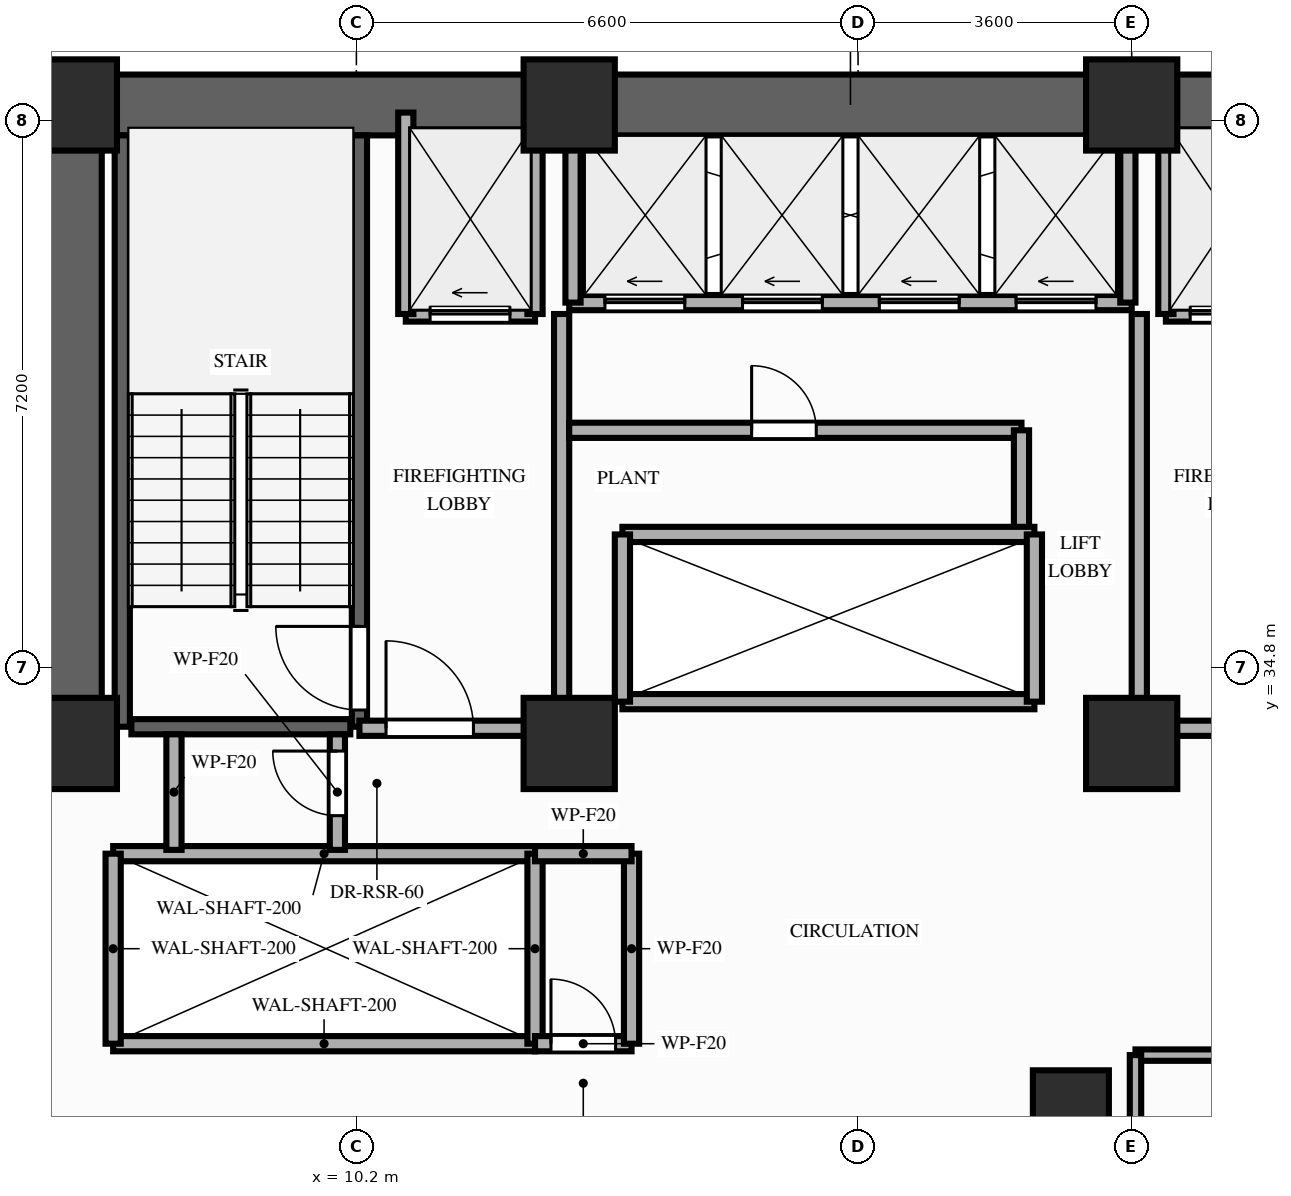
"""IFC4 building model, lengths in metres.
Left out: names, types, materials, properties, quantities, classifications, styles, units other than length and angle.
Written with IfcOpenShell. Run it as: python <this file> out.ifc"""

import sys

from ifc_helpers import new_model, si_unit, direction, frame, frame_2d, origin, origin_2d, place, context, subcontext, project, spatial, rectangle, extrude, element, fill, save


model = new_model("IFC4")
c1 = context("Model", 3, precision=1e-05, world=origin(), true_north=direction((0.0, 1.0)))
c2 = subcontext(c1, "Body", "Model", "MODEL_VIEW")
j1 = project(units=[si_unit("LENGTHUNIT", "METRE"), si_unit("PLANEANGLEUNIT", "RADIAN")], contexts=[c1])
p1 = place(None, origin())
s1 = spatial("IfcSite", under=j1, at=p1, CompositionType="ELEMENT")
p2 = place(p1, origin())
s2 = spatial("IfcBuilding", under=s1, at=p2, CompositionType="ELEMENT")
p3 = place(p2, frame((0.0, 0.0, 39.8)))
s3 = spatial("IfcBuildingStorey", under=s2, at=p3, CompositionType="ELEMENT", Elevation=39.8)
for number, where, z_axis, x_axis in (
    (1, (6.45, 33.8, 0.0), (0.0, 0.0, 1.0), (1.0, 0.0, 0.0)),
    (2, (13.0, 33.8, 0.0), (0.0, 0.0, 1.0), (1.0, 0.0, 0.0)),
    (3, (20.4, 33.8, 0.0), (0.0, 0.0, 1.0), (1.0, 0.0, 0.0)),
    (4, (6.45, 42.2, 0.0), (0.0, 0.0, 1.0), (1.0, 0.0, 0.0)),
    (5, (13.0, 42.2, 0.0), (0.0, 0.0, 1.0), (1.0, 0.0, 0.0)),
    (6, (20.4, 42.2, 0.0), (0.0, 0.0, 1.0), (1.0, 0.0, 0.0)),
):
    element("IfcColumn", number, at=place(p3, frame(where, z_axis=z_axis, x_axis=x_axis)), inside=s3, PredefinedType="COLUMN", context=c2, shape_type="SweptSolid", body=[
        extrude(rectangle(XDim=1.2, YDim=1.2, at=origin_2d()), origin(), (0.0, 0.0, 1.0), 3.8),
    ])
p4 = place(p3, frame((19.6, 28.8, 0.0), z_axis=(0.0, 0.0, 1.0), x_axis=(1.0, 0.0, 0.0)))
e7 = element("IfcColumn", 7, at=p4, inside=s3, PredefinedType="COLUMN", context=c2, shape_type="SweptSolid", body=[
    extrude(rectangle(XDim=1.0, YDim=1.4, at=origin_2d()), origin(), (0.0, 0.0, 1.0), 3.8),
])
p5 = place(p3, frame((6.45, 42.2, 0.0), z_axis=(0.0, 0.0, 1.0), x_axis=(1.0, 0.0, 0.0)))
e8 = element("IfcWall", 8, at=p5, inside=s3, PredefinedType="SHEAR", context=c2, shape_type="SweptSolid", body=[
    extrude(rectangle(XDim=20.45, YDim=0.8, at=frame_2d((10.225, 0.0))), origin(), (0.0, 0.0, 1.0), 3.62),
])
p6 = place(p3, frame((6.45, 33.8, 0.0), z_axis=(0.0, 0.0, 1.0), x_axis=(0.0, 1.0, 0.0)))
e9 = element("IfcWall", 9, at=p6, inside=s3, PredefinedType="SHEAR", context=c2, shape_type="SweptSolid", body=[
    extrude(rectangle(XDim=7.95, YDim=0.8, at=frame_2d((3.975, 0.0))), origin(), (0.0, 0.0, 1.0), 3.62),
])
p7 = place(p3, frame((7.12, 34.02, 0.0), z_axis=(0.0, 0.0, 1.0), x_axis=(0.0, 1.0, 0.0)))
e10 = element("IfcWall", 10, at=p7, inside=s3, PredefinedType="SHEAR", context=c2, shape_type="SweptSolid", body=[
    extrude(rectangle(XDim=7.78, YDim=0.2, at=frame_2d((3.89, 0.0))), origin(), (0.0, 0.0, 1.0), 3.62),
])
p8 = place(p3, frame((10.24, 34.02, 0.0), z_axis=(0.0, 0.0, 1.0), x_axis=(0.0, 1.0, 0.0)))
e11 = element("IfcWall", 11, at=p8, inside=s3, PredefinedType="SHEAR", context=c2, shape_type="SweptSolid", body=[
    extrude(rectangle(XDim=7.78, YDim=0.2, at=frame_2d((3.89, 0.0))), origin(), (0.0, 0.0, 1.0), 3.62),
])
p9 = place(p8, frame((0.22, 0.0, 0.0)))
e12 = element("IfcOpeningElement", 12, at=p9, cuts=e11, PredefinedType="OPENING", context=c2, shape_type="SweptSolid", body=[
    extrude(rectangle(XDim=1.1, YDim=2.15, at=frame_2d((0.55, 1.075))), frame((0.0, 0.11, 0.0), z_axis=(0.0, -1.0, 0.0), x_axis=(1.0, 0.0, 0.0)), (0.0, 0.0, 1.0), 0.22),
])
p10 = place(p3, frame((7.24, 34.02, 0.0), z_axis=(0.0, 0.0, 1.0), x_axis=(1.0, 0.0, 0.0)))
e13 = element("IfcWall", 13, at=p10, inside=s3, PredefinedType="SHEAR", context=c2, shape_type="SweptSolid", body=[
    extrude(rectangle(XDim=2.88, YDim=0.2, at=frame_2d((1.44, 0.0))), origin(), (0.0, 0.0, 1.0), 3.62),
])
for number, where, z_axis, x_axis in (
    (14, (7.0, 29.85, 0.0), (0.0, 0.0, 1.0), (1.0, 0.0, 0.0)),
    (15, (7.0, 32.35, 0.0), (0.0, 0.0, 1.0), (1.0, 0.0, 0.0)),
):
    element("IfcWall", number, at=place(p3, frame(where, z_axis=z_axis, x_axis=x_axis)), inside=s3, PredefinedType="MOVABLE", context=c2, shape_type="SweptSolid", body=[
        extrude(rectangle(XDim=5.55, YDim=0.2, at=frame_2d((2.775, 0.0))), origin(), (0.0, 0.0, 1.0), 3.62),
    ])
for number, where, z_axis, x_axis in (
    (16, (7.0, 29.85, 0.0), (0.0, 0.0, 1.0), (0.0, 1.0, 0.0)),
    (17, (12.55, 29.85, 0.0), (0.0, 0.0, 1.0), (0.0, 1.0, 0.0)),
):
    element("IfcWall", number, at=place(p3, frame(where, z_axis=z_axis, x_axis=x_axis)), inside=s3, PredefinedType="MOVABLE", context=c2, shape_type="SweptSolid", body=[
        extrude(rectangle(XDim=2.5, YDim=0.2, at=frame_2d((1.25, 0.0))), origin(), (0.0, 0.0, 1.0), 3.62),
    ])
p11 = place(p3, frame((10.85, 39.45, 0.0), z_axis=(0.0, 0.0, 1.0), x_axis=(1.0, 0.0, 0.0)))
e18 = element("IfcWall", 18, at=p11, inside=s3, PredefinedType="MOVABLE", context=c2, shape_type="SweptSolid", body=[
    extrude(rectangle(XDim=1.7, YDim=0.2, at=frame_2d((0.85, 0.0))), origin(), (0.0, 0.0, 1.0), 3.62),
])
p12 = place(p11, frame((0.32, 0.0, 0.0)))
e19 = element("IfcOpeningElement", 19, at=p12, cuts=e18, PredefinedType="OPENING", context=c2, shape_type="SweptSolid", body=[
    extrude(rectangle(XDim=1.05, YDim=2.15, at=frame_2d((0.525, 1.075))), frame((0.0, 0.11, 0.0), z_axis=(0.0, -1.0, 0.0), x_axis=(1.0, 0.0, 0.0)), (0.0, 0.0, 1.0), 0.22),
])
p13 = place(p3, frame((20.85, 39.45, 0.0), z_axis=(0.0, 0.0, 1.0), x_axis=(1.0, 0.0, 0.0)))
e20 = element("IfcWall", 20, at=p13, inside=s3, PredefinedType="MOVABLE", context=c2, shape_type="SweptSolid", body=[
    extrude(rectangle(XDim=1.7, YDim=0.2, at=frame_2d((0.85, 0.0))), origin(), (0.0, 0.0, 1.0), 3.62),
])
p14 = place(p13, frame((0.32, 0.0, 0.0)))
e21 = element("IfcOpeningElement", 21, at=p14, cuts=e20, PredefinedType="OPENING", context=c2, shape_type="SweptSolid", body=[
    extrude(rectangle(XDim=1.05, YDim=2.15, at=frame_2d((0.525, 1.075))), frame((0.0, 0.11, 0.0), z_axis=(0.0, -1.0, 0.0), x_axis=(1.0, 0.0, 0.0)), (0.0, 0.0, 1.0), 0.22),
])
for number, where, z_axis, x_axis in (
    (22, (10.85, 39.45, 0.0), (0.0, 0.0, 1.0), (0.0, 1.0, 0.0)),
    (23, (12.55, 39.45, 0.0), (0.0, 0.0, 1.0), (0.0, 1.0, 0.0)),
):
    element("IfcWall", number, at=place(p3, frame(where, z_axis=z_axis, x_axis=x_axis)), inside=s3, PredefinedType="MOVABLE", context=c2, shape_type="SweptSolid", body=[
        extrude(rectangle(XDim=2.65, YDim=0.2, at=frame_2d((1.325, 0.0))), origin(), (0.0, 0.0, 1.0), 3.0),
    ])
p15 = place(p3, frame((12.9, 34.0, 0.0), z_axis=(0.0, 0.0, 1.0), x_axis=(0.0, 1.0, 0.0)))
e24 = element("IfcWall", 24, at=p15, inside=s3, PredefinedType="PARTITIONING", context=c2, shape_type="SweptSolid", body=[
    extrude(rectangle(XDim=5.45, YDim=0.2, at=frame_2d((2.725, 0.0))), origin(), (0.0, 0.0, 1.0), 3.0),
])
p16 = place(p3, frame((10.24, 34.0, 0.0), z_axis=(0.0, 0.0, 1.0), x_axis=(1.0, 0.0, 0.0)))
e25 = element("IfcWall", 25, at=p16, inside=s3, PredefinedType="PARTITIONING", context=c2, shape_type="SweptSolid", body=[
    extrude(rectangle(XDim=2.66, YDim=0.2, at=frame_2d((1.33, 0.0))), origin(), (0.0, 0.0, 1.0), 3.0),
])
p17 = place(p16, frame((0.35, 0.0, 0.0)))
e26 = element("IfcOpeningElement", 26, at=p17, cuts=e25, PredefinedType="OPENING", context=c2, shape_type="SweptSolid", body=[
    extrude(rectangle(XDim=1.15, YDim=2.15, at=frame_2d((0.575, 1.075))), frame((0.0, 0.11, 0.0), z_axis=(0.0, -1.0, 0.0), x_axis=(1.0, 0.0, 0.0)), (0.0, 0.0, 1.0), 0.22),
])
p18 = place(p3, frame((20.85, 39.45, 0.0), z_axis=(0.0, 0.0, 1.0), x_axis=(0.0, 1.0, 0.0)))
e27 = element("IfcWall", 27, at=p18, inside=s3, PredefinedType="MOVABLE", context=c2, shape_type="SweptSolid", body=[
    extrude(rectangle(XDim=2.65, YDim=0.2, at=frame_2d((1.325, 0.0))), origin(), (0.0, 0.0, 1.0), 3.0),
])
p19 = place(p3, frame((20.5, 34.0, 0.0), z_axis=(0.0, 0.0, 1.0), x_axis=(0.0, 1.0, 0.0)))
e28 = element("IfcWall", 28, at=p19, inside=s3, PredefinedType="PARTITIONING", context=c2, shape_type="SweptSolid", body=[
    extrude(rectangle(XDim=5.45, YDim=0.2, at=frame_2d((2.725, 0.0))), origin(), (0.0, 0.0, 1.0), 3.0),
])
p20 = place(p3, frame((20.5, 34.0, 0.0), z_axis=(0.0, 0.0, 1.0), x_axis=(1.0, 0.0, 0.0)))
e29 = element("IfcWall", 29, at=p20, inside=s3, PredefinedType="PARTITIONING", context=c2, shape_type="SweptSolid", body=[
    extrude(rectangle(XDim=2.6, YDim=0.2, at=frame_2d((1.3, 0.0))), origin(), (0.0, 0.0, 1.0), 3.0),
])
p21 = place(p20, frame((1.05, 0.0, 0.0)))
e30 = element("IfcOpeningElement", 30, at=p21, cuts=e29, PredefinedType="OPENING", context=c2, shape_type="SweptSolid", body=[
    extrude(rectangle(XDim=1.15, YDim=2.15, at=frame_2d((0.575, 1.075))), frame((0.0, 0.11, 0.0), z_axis=(0.0, -1.0, 0.0), x_axis=(1.0, 0.0, 0.0)), (0.0, 0.0, 1.0), 0.22),
])
p22 = place(p3, frame((12.55, 29.85, 0.0), z_axis=(0.0, 0.0, 1.0), x_axis=(1.0, 0.0, 0.0)))
e31 = element("IfcWall", 31, at=p22, inside=s3, PredefinedType="PARTITIONING", context=c2, shape_type="SweptSolid", body=[
    extrude(rectangle(XDim=1.27, YDim=0.2, at=frame_2d((0.635, 0.0))), origin(), (0.0, 0.0, 1.0), 3.62),
])
p23 = place(p22, frame((0.21, 0.0, 0.0)))
e32 = element("IfcOpeningElement", 32, at=p23, cuts=e31, PredefinedType="OPENING", context=c2, shape_type="SweptSolid", body=[
    extrude(rectangle(XDim=0.85, YDim=2.05, at=frame_2d((0.425, 1.025))), frame((0.0, 0.11, 0.0), z_axis=(0.0, -1.0, 0.0), x_axis=(1.0, 0.0, 0.0)), (0.0, 0.0, 1.0), 0.22),
])
p24 = place(p3, frame((13.82, 29.85, 0.0), z_axis=(0.0, 0.0, 1.0), x_axis=(0.0, 1.0, 0.0)))
e33 = element("IfcWall", 33, at=p24, inside=s3, PredefinedType="PARTITIONING", context=c2, shape_type="SweptSolid", body=[
    extrude(rectangle(XDim=2.5, YDim=0.2, at=frame_2d((1.25, 0.0))), origin(), (0.0, 0.0, 1.0), 3.62),
])
p25 = place(p3, frame((12.55, 32.35, 0.0), z_axis=(0.0, 0.0, 1.0), x_axis=(1.0, 0.0, 0.0)))
e34 = element("IfcWall", 34, at=p25, inside=s3, PredefinedType="PARTITIONING", context=c2, shape_type="SweptSolid", body=[
    extrude(rectangle(XDim=1.27, YDim=0.2, at=frame_2d((0.635, 0.0))), origin(), (0.0, 0.0, 1.0), 3.62),
])
p26 = place(p3, frame((7.8, 32.4, 0.0), z_axis=(0.0, 0.0, 1.0), x_axis=(0.0, 1.0, 0.0)))
e35 = element("IfcWall", 35, at=p26, inside=s3, PredefinedType="PARTITIONING", context=c2, shape_type="SweptSolid", body=[
    extrude(rectangle(XDim=1.52, YDim=0.2, at=frame_2d((0.76, 0.0))), origin(), (0.0, 0.0, 1.0), 3.0),
])
p27 = place(p3, frame((9.95, 32.4, 0.0), z_axis=(0.0, 0.0, 1.0), x_axis=(0.0, 1.0, 0.0)))
e36 = element("IfcWall", 36, at=p27, inside=s3, PredefinedType="PARTITIONING", context=c2, shape_type="SweptSolid", body=[
    extrude(rectangle(XDim=1.52, YDim=0.2, at=frame_2d((0.76, 0.0))), origin(), (0.0, 0.0, 1.0), 3.0),
])
p28 = place(p27, frame((0.45, 0.0, 0.0)))
e37 = element("IfcOpeningElement", 37, at=p28, cuts=e36, PredefinedType="OPENING", context=c2, shape_type="SweptSolid", body=[
    extrude(rectangle(XDim=0.85, YDim=2.05, at=frame_2d((0.425, 1.025))), frame((0.0, 0.11, 0.0), z_axis=(0.0, -1.0, 0.0), x_axis=(1.0, 0.0, 0.0)), (0.0, 0.0, 1.0), 0.22),
])
p29 = place(p3, frame((13.0, 39.6, 0.0), z_axis=(0.0, 0.0, 1.0), x_axis=(1.0, 0.0, 0.0)))
e38 = element("IfcWall", 38, at=p29, inside=s3, PredefinedType="MOVABLE", context=c2, shape_type="SweptSolid", body=[
    extrude(rectangle(XDim=7.4, YDim=0.2, at=frame_2d((3.7, 0.0))), origin(), (0.0, 0.0, 1.0), 3.62),
])
p30 = place(p29, frame((0.47, 0.0, 0.0)))
e39 = element("IfcOpeningElement", 39, at=p30, cuts=e38, PredefinedType="OPENING", context=c2, shape_type="SweptSolid", body=[
    extrude(rectangle(XDim=1.05, YDim=2.15, at=frame_2d((0.525, 1.075))), frame((0.0, 0.11, 0.0), z_axis=(0.0, -1.0, 0.0), x_axis=(1.0, 0.0, 0.0)), (0.0, 0.0, 1.0), 0.22),
])
p31 = place(p29, frame((2.28, 0.0, 0.0)))
e40 = element("IfcOpeningElement", 40, at=p31, cuts=e38, PredefinedType="OPENING", context=c2, shape_type="SweptSolid", body=[
    extrude(rectangle(XDim=1.05, YDim=2.15, at=frame_2d((0.525, 1.075))), frame((0.0, 0.11, 0.0), z_axis=(0.0, -1.0, 0.0), x_axis=(1.0, 0.0, 0.0)), (0.0, 0.0, 1.0), 0.22),
])
p32 = place(p29, frame((4.08, 0.0, 0.0)))
e41 = element("IfcOpeningElement", 41, at=p32, cuts=e38, PredefinedType="OPENING", context=c2, shape_type="SweptSolid", body=[
    extrude(rectangle(XDim=1.05, YDim=2.15, at=frame_2d((0.525, 1.075))), frame((0.0, 0.11, 0.0), z_axis=(0.0, -1.0, 0.0), x_axis=(1.0, 0.0, 0.0)), (0.0, 0.0, 1.0), 0.22),
])
p33 = place(p29, frame((5.88, 0.0, 0.0)))
e42 = element("IfcOpeningElement", 42, at=p33, cuts=e38, PredefinedType="OPENING", context=c2, shape_type="SweptSolid", body=[
    extrude(rectangle(XDim=1.05, YDim=2.15, at=frame_2d((0.525, 1.075))), frame((0.0, 0.11, 0.0), z_axis=(0.0, -1.0, 0.0), x_axis=(1.0, 0.0, 0.0)), (0.0, 0.0, 1.0), 0.22),
])
for number, where, z_axis, x_axis in (
    (43, (13.05, 39.6, 0.0), (0.0, 0.0, 1.0), (0.0, 1.0, 0.0)),
    (44, (20.35, 39.6, 0.0), (0.0, 0.0, 1.0), (0.0, 1.0, 0.0)),
):
    element("IfcWall", number, at=place(p3, frame(where, z_axis=z_axis, x_axis=x_axis)), inside=s3, PredefinedType="MOVABLE", context=c2, shape_type="SweptSolid", body=[
        extrude(rectangle(XDim=2.18, YDim=0.2, at=frame_2d((1.09, 0.0))), origin(), (0.0, 0.0, 1.0), 3.62),
    ])
p34 = place(p3, frame((13.0, 37.92, 0.0), z_axis=(0.0, 0.0, 1.0), x_axis=(1.0, 0.0, 0.0)))
e45 = element("IfcWall", 45, at=p34, inside=s3, PredefinedType="PARTITIONING", context=c2, shape_type="SweptSolid", body=[
    extrude(rectangle(XDim=5.95, YDim=0.2, at=frame_2d((2.975, 0.0))), origin(), (0.0, 0.0, 1.0), 3.62),
])
p35 = place(p34, frame((2.4, 0.0, 0.0)))
e46 = element("IfcOpeningElement", 46, at=p35, cuts=e45, PredefinedType="OPENING", context=c2, shape_type="SweptSolid", body=[
    extrude(rectangle(XDim=0.85, YDim=2.05, at=frame_2d((0.425, 1.025))), frame((0.0, 0.11, 0.0), z_axis=(0.0, -1.0, 0.0), x_axis=(1.0, 0.0, 0.0)), (0.0, 0.0, 1.0), 0.22),
])
p36 = place(p3, frame((18.95, 36.6, 0.0), z_axis=(0.0, 0.0, 1.0), x_axis=(0.0, 1.0, 0.0)))
e47 = element("IfcWall", 47, at=p36, inside=s3, PredefinedType="PARTITIONING", context=c2, shape_type="SweptSolid", body=[
    extrude(rectangle(XDim=1.32, YDim=0.2, at=frame_2d((0.66, 0.0))), origin(), (0.0, 0.0, 1.0), 3.62),
])
for number, where, z_axis, x_axis in (
    (48, (13.7, 34.35, 0.0), (0.0, 0.0, 1.0), (1.0, 0.0, 0.0)),
    (49, (13.7, 36.55, 0.0), (0.0, 0.0, 1.0), (1.0, 0.0, 0.0)),
):
    element("IfcWall", number, at=place(p3, frame(where, z_axis=z_axis, x_axis=x_axis)), inside=s3, PredefinedType="MOVABLE", context=c2, shape_type="SweptSolid", body=[
        extrude(rectangle(XDim=5.42, YDim=0.2, at=frame_2d((2.71, 0.0))), origin(), (0.0, 0.0, 1.0), 3.62),
    ])
for number, where, z_axis, x_axis in (
    (50, (13.7, 34.35, 0.0), (0.0, 0.0, 1.0), (0.0, 1.0, 0.0)),
    (51, (19.12, 34.35, 0.0), (0.0, 0.0, 1.0), (0.0, 1.0, 0.0)),
):
    element("IfcWall", number, at=place(p3, frame(where, z_axis=z_axis, x_axis=x_axis)), inside=s3, PredefinedType="MOVABLE", context=c2, shape_type="SweptSolid", body=[
        extrude(rectangle(XDim=2.2, YDim=0.2, at=frame_2d((1.1, 0.0))), origin(), (0.0, 0.0, 1.0), 3.62),
    ])
p37 = place(p3, frame((20.45, 29.7, 0.0), z_axis=(0.0, 0.0, 1.0), x_axis=(1.0, 0.0, 0.0)))
e52 = element("IfcWall", 52, at=p37, inside=s3, PredefinedType="PARTITIONING", context=c2, shape_type="SweptSolid", body=[
    extrude(rectangle(XDim=6.7, YDim=0.15, at=frame_2d((3.35, 0.0))), origin(), (0.0, 0.0, 1.0), 3.62),
])
p38 = place(p37, frame((2.8, 0.0, 0.0)))
e53 = element("IfcOpeningElement", 53, at=p38, cuts=e52, PredefinedType="OPENING", context=c2, shape_type="SweptSolid", body=[
    extrude(rectangle(XDim=0.95, YDim=2.15, at=frame_2d((0.475, 1.075))), frame((0.0, 0.085, 0.0), z_axis=(0.0, -1.0, 0.0), x_axis=(1.0, 0.0, 0.0)), (0.0, 0.0, 1.0), 0.17),
])
p39 = place(p3, frame((20.45, 26.75, 0.0), z_axis=(0.0, 0.0, 1.0), x_axis=(0.0, 1.0, 0.0)))
e54 = element("IfcWall", 54, at=p39, inside=s3, PredefinedType="PARTITIONING", context=c2, shape_type="SweptSolid", body=[
    extrude(rectangle(XDim=2.95, YDim=0.15, at=frame_2d((1.475, 0.0))), origin(), (0.0, 0.0, 1.0), 3.0),
])
p40 = place(p9, origin())
e55 = element("IfcDoor", 55, at=p40, inside=s3, OperationType="SINGLE_SWING_RIGHT", PredefinedType="DOOR", context=c2, shape_type="SweptSolid", body=[
    extrude(rectangle(XDim=1.1, YDim=2.15, at=frame_2d((0.55, 1.075))), frame((0.0, 0.025, 0.0), z_axis=(0.0, -1.0, 0.0), x_axis=(1.0, 0.0, 0.0)), (0.0, 0.0, 1.0), 0.05),
])
fill(e12, e55)
p41 = place(p12, origin())
e56 = element("IfcDoor", 56, at=p41, inside=s3, OperationType="SLIDING_TO_LEFT", PredefinedType="DOOR", context=c2, shape_type="SweptSolid", body=[
    extrude(rectangle(XDim=1.05, YDim=2.15, at=frame_2d((0.525, 1.075))), frame((0.0, 0.025, 0.0), z_axis=(0.0, -1.0, 0.0), x_axis=(1.0, 0.0, 0.0)), (0.0, 0.0, 1.0), 0.05),
])
fill(e19, e56)
p42 = place(p14, origin())
e57 = element("IfcDoor", 57, at=p42, inside=s3, OperationType="SLIDING_TO_LEFT", PredefinedType="DOOR", context=c2, shape_type="SweptSolid", body=[
    extrude(rectangle(XDim=1.05, YDim=2.15, at=frame_2d((0.525, 1.075))), frame((0.0, 0.025, 0.0), z_axis=(0.0, -1.0, 0.0), x_axis=(1.0, 0.0, 0.0)), (0.0, 0.0, 1.0), 0.05),
])
fill(e21, e57)
p43 = place(p17, origin())
e58 = element("IfcDoor", 58, at=p43, inside=s3, OperationType="SINGLE_SWING_LEFT", PredefinedType="DOOR", context=c2, shape_type="SweptSolid", body=[
    extrude(rectangle(XDim=1.15, YDim=2.15, at=frame_2d((0.575, 1.075))), frame((0.0, 0.025, 0.0), z_axis=(0.0, -1.0, 0.0), x_axis=(1.0, 0.0, 0.0)), (0.0, 0.0, 1.0), 0.05),
])
fill(e26, e58)
p44 = place(p23, origin())
e59 = element("IfcDoor", 59, at=p44, inside=s3, OperationType="SINGLE_SWING_LEFT", PredefinedType="DOOR", context=c2, shape_type="SweptSolid", body=[
    extrude(rectangle(XDim=0.85, YDim=2.05, at=frame_2d((0.425, 1.025))), frame((0.0, 0.025, 0.0), z_axis=(0.0, -1.0, 0.0), x_axis=(1.0, 0.0, 0.0)), (0.0, 0.0, 1.0), 0.05),
])
fill(e32, e59)
p45 = place(p28, origin())
e60 = element("IfcDoor", 60, at=p45, inside=s3, OperationType="SINGLE_SWING_RIGHT", PredefinedType="DOOR", context=c2, shape_type="SweptSolid", body=[
    extrude(rectangle(XDim=0.85, YDim=2.05, at=frame_2d((0.425, 1.025))), frame((0.0, 0.025, 0.0), z_axis=(0.0, -1.0, 0.0), x_axis=(1.0, 0.0, 0.0)), (0.0, 0.0, 1.0), 0.05),
])
fill(e37, e60)
p46 = place(p30, origin())
e61 = element("IfcDoor", 61, at=p46, inside=s3, OperationType="SLIDING_TO_LEFT", PredefinedType="DOOR", context=c2, shape_type="SweptSolid", body=[
    extrude(rectangle(XDim=1.05, YDim=2.15, at=frame_2d((0.525, 1.075))), frame((0.0, 0.025, 0.0), z_axis=(0.0, -1.0, 0.0), x_axis=(1.0, 0.0, 0.0)), (0.0, 0.0, 1.0), 0.05),
])
fill(e39, e61)
p47 = place(p31, origin())
e62 = element("IfcDoor", 62, at=p47, inside=s3, OperationType="SLIDING_TO_LEFT", PredefinedType="DOOR", context=c2, shape_type="SweptSolid", body=[
    extrude(rectangle(XDim=1.05, YDim=2.15, at=frame_2d((0.525, 1.075))), frame((0.0, 0.025, 0.0), z_axis=(0.0, -1.0, 0.0), x_axis=(1.0, 0.0, 0.0)), (0.0, 0.0, 1.0), 0.05),
])
fill(e40, e62)
p48 = place(p32, origin())
e63 = element("IfcDoor", 63, at=p48, inside=s3, OperationType="SLIDING_TO_LEFT", PredefinedType="DOOR", context=c2, shape_type="SweptSolid", body=[
    extrude(rectangle(XDim=1.05, YDim=2.15, at=frame_2d((0.525, 1.075))), frame((0.0, 0.025, 0.0), z_axis=(0.0, -1.0, 0.0), x_axis=(1.0, 0.0, 0.0)), (0.0, 0.0, 1.0), 0.05),
])
fill(e41, e63)
p49 = place(p33, origin())
e64 = element("IfcDoor", 64, at=p49, inside=s3, OperationType="SLIDING_TO_LEFT", PredefinedType="DOOR", context=c2, shape_type="SweptSolid", body=[
    extrude(rectangle(XDim=1.05, YDim=2.15, at=frame_2d((0.525, 1.075))), frame((0.0, 0.025, 0.0), z_axis=(0.0, -1.0, 0.0), x_axis=(1.0, 0.0, 0.0)), (0.0, 0.0, 1.0), 0.05),
])
fill(e42, e64)
p50 = place(p35, origin())
e65 = element("IfcDoor", 65, at=p50, inside=s3, OperationType="SINGLE_SWING_LEFT", PredefinedType="DOOR", context=c2, shape_type="SweptSolid", body=[
    extrude(rectangle(XDim=0.85, YDim=2.05, at=frame_2d((0.425, 1.025))), frame((0.0, 0.025, 0.0), z_axis=(0.0, -1.0, 0.0), x_axis=(1.0, 0.0, 0.0)), (0.0, 0.0, 1.0), 0.05),
])
fill(e46, e65)
save(model, sys.argv[1])
